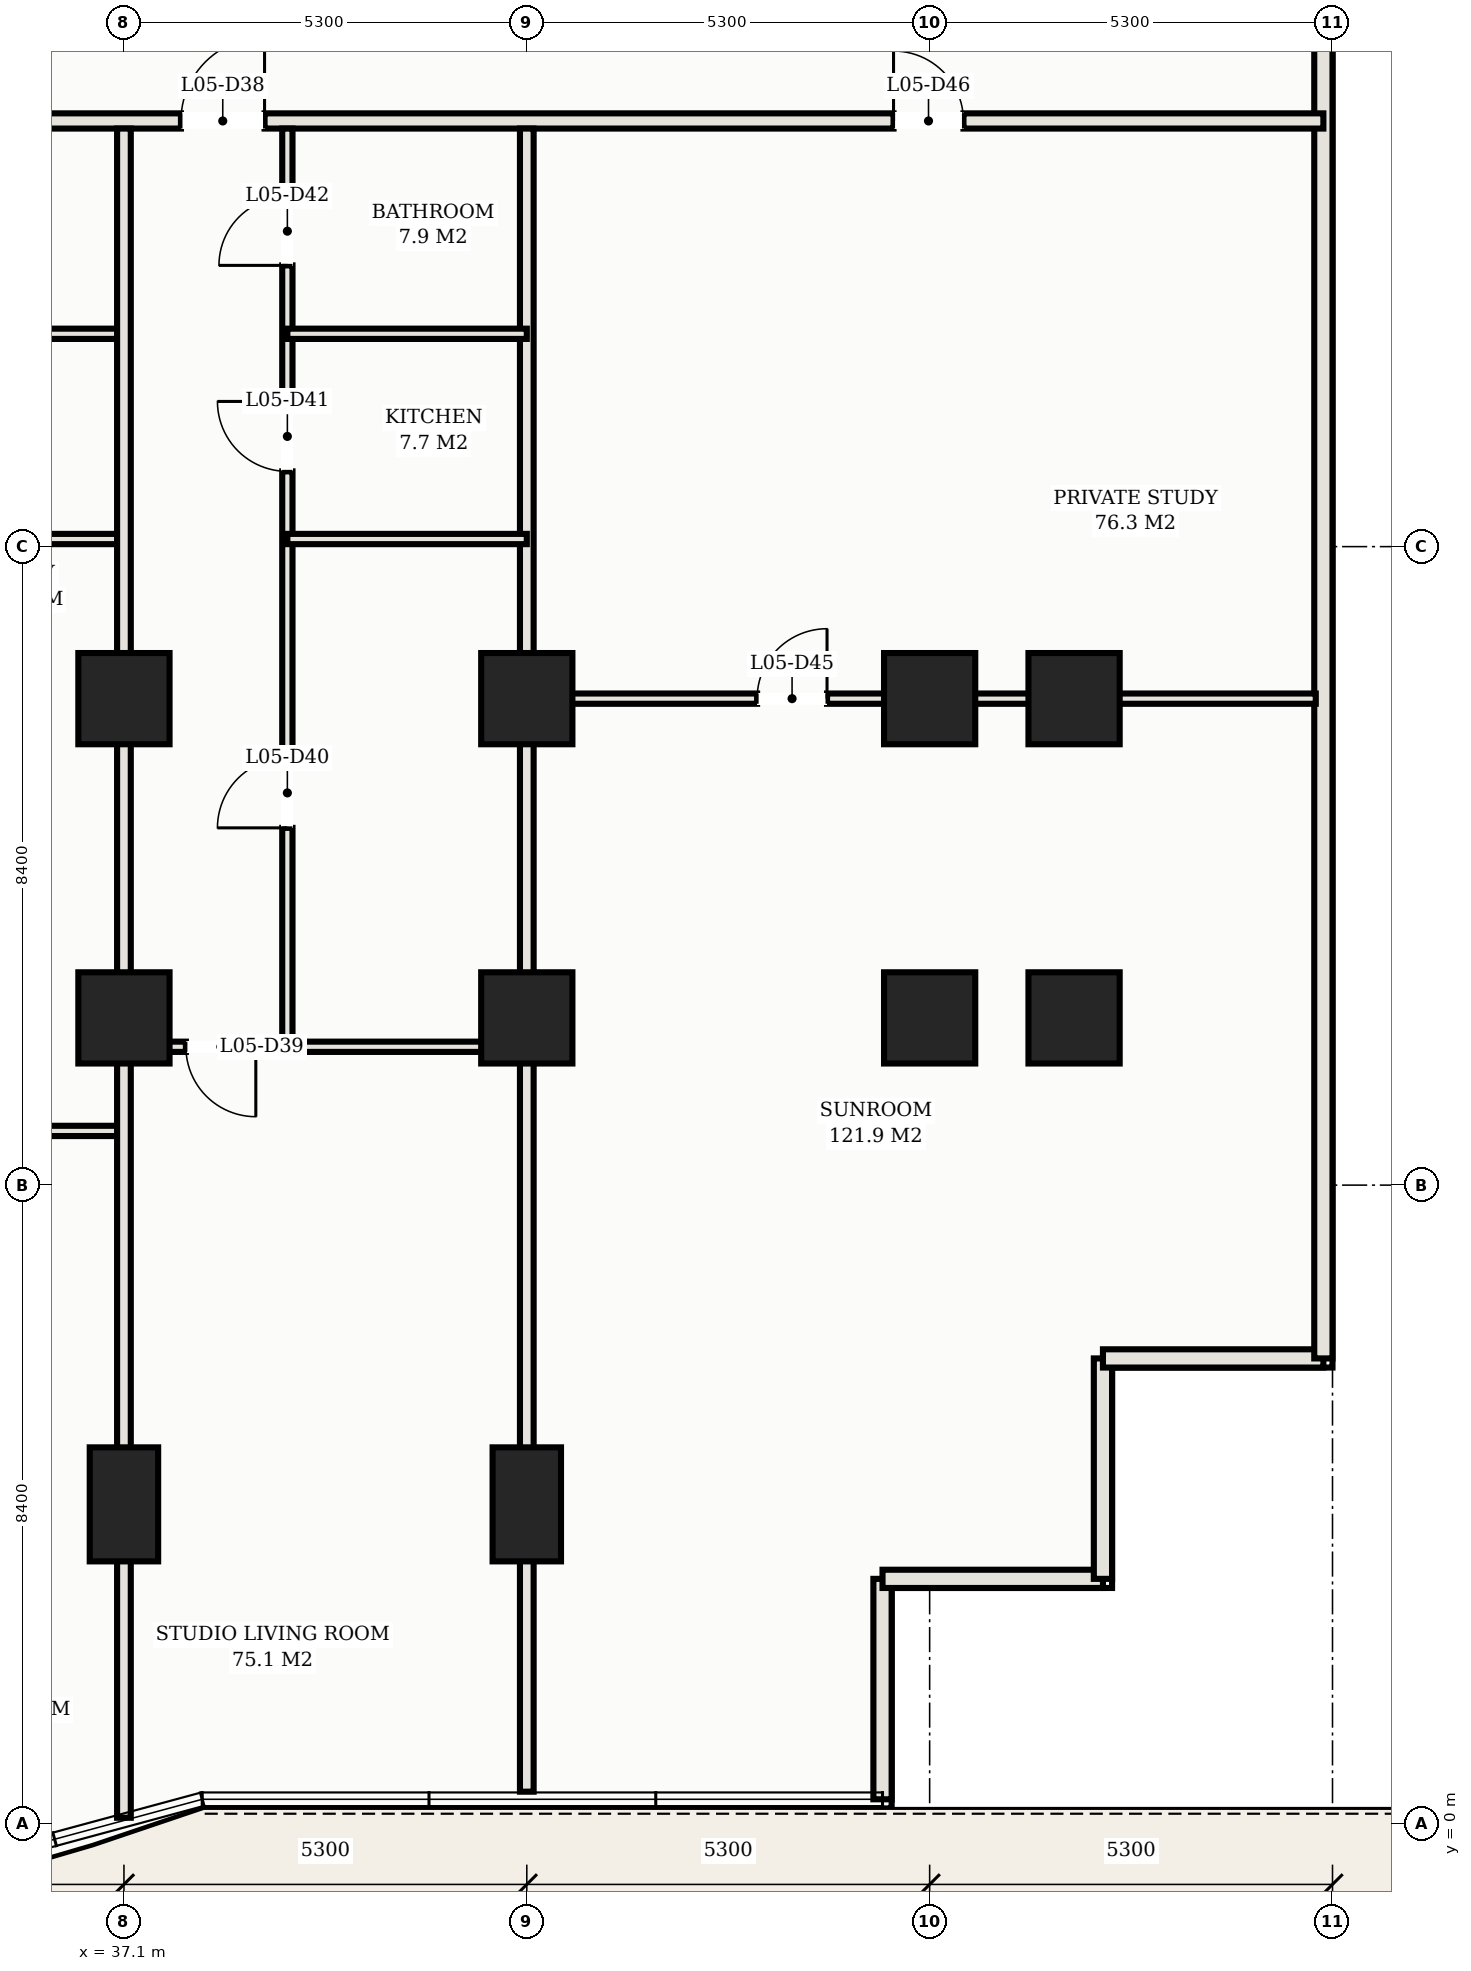
"""IFC4 building model, lengths in metres.
Left out: names, types, materials, properties, quantities, classifications, styles, units other than length and angle.
Written with IfcOpenShell. Run it as: python <this file> out.ifc"""

import sys

from ifc_helpers import new_model, si_unit, direction, frame, frame_2d, origin, origin_2d, place, context, subcontext, project, spatial, rectangle, hollow_rectangle, extrude, element, fill, save


model = new_model("IFC4")
c1 = context("Model", 3, precision=1e-05, world=origin(), true_north=direction((0.0, 1.0)))
c2 = subcontext(c1, "Body", "Model", "MODEL_VIEW")
j1 = project(units=[si_unit("LENGTHUNIT", "METRE"), si_unit("PLANEANGLEUNIT", "RADIAN")], contexts=[c1])
p1 = place(None, origin())
s1 = spatial("IfcSite", under=j1, at=p1, CompositionType="ELEMENT")
p2 = place(p1, origin())
s2 = spatial("IfcBuilding", under=s1, at=p2, CompositionType="ELEMENT")
p3 = place(p2, frame((0.0, 0.0, 24.2)))
s3 = spatial("IfcBuildingStorey", under=s2, at=p3, CompositionType="ELEMENT", Elevation=24.2)
for number, where, z_axis, x_axis in (
    (1, (37.1, 14.8, 0.0), (0.0, 0.0, 1.0), (1.0, 0.0, 0.0)),
    (2, (37.1, 10.6, 0.0), (0.0, 0.0, 1.0), (1.0, 0.0, 0.0)),
    (3, (42.4, 14.8, 0.0), (0.0, 0.0, 1.0), (1.0, 0.0, 0.0)),
    (4, (42.4, 10.6, 0.0), (0.0, 0.0, 1.0), (1.0, 0.0, 0.0)),
):
    element("IfcColumn", number, at=place(p3, frame(where, z_axis=z_axis, x_axis=x_axis)), inside=s3, PredefinedType="COLUMN", context=c2, shape_type="SweptSolid", body=[
        extrude(hollow_rectangle(XDim=1.2, YDim=1.2, WallThickness=0.04, at=origin_2d()), origin(), (0.0, 0.0, 1.0), 3.3),
    ])
for number, where, z_axis, x_axis in (
    (5, (37.1, 4.2, 0.0), (0.0, 0.0, 1.0), (1.0, 0.0, 0.0)),
    (6, (42.4, 4.2, 0.0), (0.0, 0.0, 1.0), (1.0, 0.0, 0.0)),
):
    element("IfcColumn", number, at=place(p3, frame(where, z_axis=z_axis, x_axis=x_axis)), inside=s3, PredefinedType="COLUMN", context=c2, shape_type="SweptSolid", body=[
        extrude(hollow_rectangle(XDim=0.9, YDim=1.5, WallThickness=0.036, at=origin_2d()), origin(), (0.0, 0.0, 1.0), 3.3),
    ])
for number, where, z_axis, x_axis in (
    (7, (47.7, 10.6, 0.0), (0.0, 0.0, 1.0), (1.0, 0.0, 0.0)),
    (8, (47.7, 14.8, 0.0), (0.0, 0.0, 1.0), (1.0, 0.0, 0.0)),
    (9, (49.6, 10.6, 0.0), (0.0, 0.0, 1.0), (1.0, 0.0, 0.0)),
    (10, (49.6, 14.8, 0.0), (0.0, 0.0, 1.0), (1.0, 0.0, 0.0)),
):
    element("IfcColumn", number, at=place(p3, frame(where, z_axis=z_axis, x_axis=x_axis)), inside=s3, PredefinedType="COLUMN", context=c2, shape_type="SweptSolid", body=[
        extrude(hollow_rectangle(XDim=1.2, YDim=1.2, WallThickness=0.04, at=origin_2d()), origin(), (0.0, 0.0, 1.0), 3.3),
    ])
for number, where, z_axis, x_axis in (
    (11, (47.08, 0.32, 0.0), (0.0, 0.0, 1.0), (0.0, 1.0, 0.0)),
    (12, (47.08, 3.22, 0.0), (0.0, 0.0, 1.0), (1.0, 0.0, 0.0)),
):
    element("IfcWall", number, at=place(p3, frame(where, z_axis=z_axis, x_axis=x_axis)), inside=s3, PredefinedType="SOLIDWALL", context=c2, shape_type="SweptSolid", body=[
        extrude(rectangle(XDim=2.9, YDim=0.24, at=frame_2d((1.45, 0.0))), origin(), (0.0, 0.0, 1.0), 3.08),
    ])
p4 = place(p3, frame((49.98, 3.22, 0.0), z_axis=(0.0, 0.0, 1.0), x_axis=(0.0, 1.0, 0.0)))
e13 = element("IfcWall", 13, at=p4, inside=s3, PredefinedType="SOLIDWALL", context=c2, shape_type="SweptSolid", body=[
    extrude(rectangle(XDim=2.9, YDim=0.24, at=frame_2d((1.45, 0.0))), origin(), (0.0, 0.0, 1.0), 3.08),
])
p5 = place(p3, frame((49.98, 6.12, 0.0), z_axis=(0.0, 0.0, 1.0), x_axis=(1.0, 0.0, 0.0)))
e14 = element("IfcWall", 14, at=p5, inside=s3, PredefinedType="SOLIDWALL", context=c2, shape_type="SweptSolid", body=[
    extrude(rectangle(XDim=2.9, YDim=0.24, at=frame_2d((1.45, 0.0))), origin(), (0.0, 0.0, 1.0), 3.08),
])
p6 = place(p3, frame((52.88, 6.12, 0.0), z_axis=(0.0, 0.0, 1.0), x_axis=(0.0, 1.0, 0.0)))
e15 = element("IfcWall", 15, at=p6, inside=s3, PredefinedType="SOLIDWALL", context=c2, shape_type="SweptSolid", body=[
    extrude(rectangle(XDim=28.81, YDim=0.24, at=frame_2d((14.405, 0.0))), origin(), (0.0, 0.0, 1.0), 3.08),
])
p7 = place(p3, frame((0.12, 22.4, 0.0), z_axis=(0.0, 0.0, 1.0), x_axis=(1.0, 0.0, 0.0)))
e16 = element("IfcWall", 16, at=p7, inside=s3, PredefinedType="PARTITIONING", context=c2, shape_type="SweptSolid", body=[
    extrude(rectangle(XDim=52.76, YDim=0.2, at=frame_2d((26.38, 0.0))), origin(), (0.0, 0.0, 1.0), 2.57),
])
p8 = place(p7, frame((11.23, 0.0, 0.0)))
e17 = element("IfcOpeningElement", 17, at=p8, cuts=e16, PredefinedType="OPENING", context=c2, shape_type="SweptSolid", body=[
    extrude(rectangle(XDim=1.1, YDim=2.25, at=frame_2d((0.55, 1.125))), frame((0.0, 0.11, 0.0), z_axis=(0.0, -1.0, 0.0), x_axis=(1.0, 0.0, 0.0)), (0.0, 0.0, 1.0), 0.22),
])
p9 = place(p7, frame((16.53, 0.0, 0.0)))
e18 = element("IfcOpeningElement", 18, at=p9, cuts=e16, PredefinedType="OPENING", context=c2, shape_type="SweptSolid", body=[
    extrude(rectangle(XDim=1.1, YDim=2.25, at=frame_2d((0.55, 1.125))), frame((0.0, 0.11, 0.0), z_axis=(0.0, -1.0, 0.0), x_axis=(1.0, 0.0, 0.0)), (0.0, 0.0, 1.0), 0.22),
])
p10 = place(p7, frame((21.83, 0.0, 0.0)))
e19 = element("IfcOpeningElement", 19, at=p10, cuts=e16, PredefinedType="OPENING", context=c2, shape_type="SweptSolid", body=[
    extrude(rectangle(XDim=1.1, YDim=2.25, at=frame_2d((0.55, 1.125))), frame((0.0, 0.11, 0.0), z_axis=(0.0, -1.0, 0.0), x_axis=(1.0, 0.0, 0.0)), (0.0, 0.0, 1.0), 0.22),
])
p11 = place(p7, frame((27.13, 0.0, 0.0)))
e20 = element("IfcOpeningElement", 20, at=p11, cuts=e16, PredefinedType="OPENING", context=c2, shape_type="SweptSolid", body=[
    extrude(rectangle(XDim=1.1, YDim=2.25, at=frame_2d((0.55, 1.125))), frame((0.0, 0.11, 0.0), z_axis=(0.0, -1.0, 0.0), x_axis=(1.0, 0.0, 0.0)), (0.0, 0.0, 1.0), 0.22),
])
p12 = place(p7, frame((32.43, 0.0, 0.0)))
e21 = element("IfcOpeningElement", 21, at=p12, cuts=e16, PredefinedType="OPENING", context=c2, shape_type="SweptSolid", body=[
    extrude(rectangle(XDim=1.1, YDim=2.25, at=frame_2d((0.55, 1.125))), frame((0.0, 0.11, 0.0), z_axis=(0.0, -1.0, 0.0), x_axis=(1.0, 0.0, 0.0)), (0.0, 0.0, 1.0), 0.22),
])
p13 = place(p7, frame((37.73, 0.0, 0.0)))
e22 = element("IfcOpeningElement", 22, at=p13, cuts=e16, PredefinedType="OPENING", context=c2, shape_type="SweptSolid", body=[
    extrude(rectangle(XDim=1.1, YDim=2.25, at=frame_2d((0.55, 1.125))), frame((0.0, 0.11, 0.0), z_axis=(0.0, -1.0, 0.0), x_axis=(1.0, 0.0, 0.0)), (0.0, 0.0, 1.0), 0.22),
])
p14 = place(p7, frame((4.735, 0.0, 0.0)))
e23 = element("IfcOpeningElement", 23, at=p14, cuts=e16, PredefinedType="OPENING", context=c2, shape_type="SweptSolid", body=[
    extrude(rectangle(XDim=0.92, YDim=2.15, at=frame_2d((0.46, 1.075))), frame((0.0, 0.11, 0.0), z_axis=(0.0, -1.0, 0.0), x_axis=(1.0, 0.0, 0.0)), (0.0, 0.0, 1.0), 0.22),
])
p15 = place(p7, frame((47.105, 0.0, 0.0)))
e24 = element("IfcOpeningElement", 24, at=p15, cuts=e16, PredefinedType="OPENING", context=c2, shape_type="SweptSolid", body=[
    extrude(rectangle(XDim=0.92, YDim=2.15, at=frame_2d((0.46, 1.075))), frame((0.0, 0.11, 0.0), z_axis=(0.0, -1.0, 0.0), x_axis=(1.0, 0.0, 0.0)), (0.0, 0.0, 1.0), 0.22),
])
p16 = place(p3, frame((42.4, 0.42, 0.0), z_axis=(0.0, 0.0, 1.0), x_axis=(0.0, 1.0, 0.0)))
e25 = element("IfcWall", 25, at=p16, inside=s3, PredefinedType="PARTITIONING", context=c2, shape_type="SweptSolid", body=[
    extrude(rectangle(XDim=21.88, YDim=0.18, at=frame_2d((10.94, 0.0))), origin(), (0.0, 0.0, 1.0), 2.275),
])
p17 = place(p3, frame((31.8, 9.113, 0.0), z_axis=(0.0, 0.0, 1.0), x_axis=(1.0, 0.0, 0.0)))
e26 = element("IfcWall", 26, at=p17, inside=s3, PredefinedType="PARTITIONING", context=c2, shape_type="SweptSolid", body=[
    extrude(rectangle(XDim=5.3, YDim=0.135, at=frame_2d((2.65, 0.0))), origin(), (0.0, 0.0, 1.0), 2.57),
])
p18 = place(p17, frame((0.815, 0.0, 0.0)))
e27 = element("IfcOpeningElement", 27, at=p18, cuts=e26, PredefinedType="OPENING", context=c2, shape_type="SweptSolid", body=[
    extrude(rectangle(XDim=0.92, YDim=2.15, at=frame_2d((0.46, 1.075))), frame((0.0, 0.078, 0.0), z_axis=(0.0, -1.0, 0.0), x_axis=(1.0, 0.0, 0.0)), (0.0, 0.0, 1.0), 0.155),
])
for number, where, z_axis, x_axis in (
    (28, (33.95, 16.9, 0.0), (0.0, 0.0, 1.0), (1.0, 0.0, 0.0)),
    (29, (33.95, 19.6, 0.0), (0.0, 0.0, 1.0), (1.0, 0.0, 0.0)),
):
    element("IfcWall", number, at=place(p3, frame(where, z_axis=z_axis, x_axis=x_axis)), inside=s3, PredefinedType="PARTITIONING", context=c2, shape_type="SweptSolid", body=[
        extrude(rectangle(XDim=3.15, YDim=0.135, at=frame_2d((1.575, 0.0))), origin(), (0.0, 0.0, 1.0), 2.57),
    ])
p19 = place(p3, frame((37.1, 0.077, 0.0), z_axis=(0.0, 0.0, 1.0), x_axis=(0.0, 1.0, 0.0)))
e30 = element("IfcWall", 30, at=p19, inside=s3, PredefinedType="PARTITIONING", context=c2, shape_type="SweptSolid", body=[
    extrude(rectangle(XDim=22.223, YDim=0.18, at=frame_2d((11.112, 0.0))), origin(), (0.0, 0.0, 1.0), 2.275),
])
p20 = place(p3, frame((37.1, 10.22, 0.0), z_axis=(0.0, 0.0, 1.0), x_axis=(1.0, 0.0, 0.0)))
e31 = element("IfcWall", 31, at=p20, inside=s3, PredefinedType="PARTITIONING", context=c2, shape_type="SweptSolid", body=[
    extrude(rectangle(XDim=5.3, YDim=0.135, at=frame_2d((2.65, 0.0))), origin(), (0.0, 0.0, 1.0), 2.57),
])
p21 = place(p20, frame((0.815, 0.0, 0.0)))
e32 = element("IfcOpeningElement", 32, at=p21, cuts=e31, PredefinedType="OPENING", context=c2, shape_type="SweptSolid", body=[
    extrude(rectangle(XDim=0.92, YDim=2.15, at=frame_2d((0.46, 1.075))), frame((0.0, 0.078, 0.0), z_axis=(0.0, -1.0, 0.0), x_axis=(1.0, 0.0, 0.0)), (0.0, 0.0, 1.0), 0.155),
])
p22 = place(p3, frame((39.25, 10.22, 0.0), z_axis=(0.0, 0.0, 1.0), x_axis=(0.0, 1.0, 0.0)))
e33 = element("IfcWall", 33, at=p22, inside=s3, PredefinedType="PARTITIONING", context=c2, shape_type="SweptSolid", body=[
    extrude(rectangle(XDim=12.08, YDim=0.135, at=frame_2d((6.04, 0.0))), origin(), (0.0, 0.0, 1.0), 2.57),
])
p23 = place(p22, frame((2.88, 0.0, 0.0)))
e34 = element("IfcOpeningElement", 34, at=p23, cuts=e33, PredefinedType="OPENING", context=c2, shape_type="SweptSolid", body=[
    extrude(rectangle(XDim=0.92, YDim=2.15, at=frame_2d((0.46, 1.075))), frame((0.0, 0.078, 0.0), z_axis=(0.0, -1.0, 0.0), x_axis=(1.0, 0.0, 0.0)), (0.0, 0.0, 1.0), 0.155),
])
p24 = place(p22, frame((7.57, 0.0, 0.0)))
e35 = element("IfcOpeningElement", 35, at=p24, cuts=e33, PredefinedType="OPENING", context=c2, shape_type="SweptSolid", body=[
    extrude(rectangle(XDim=0.92, YDim=2.15, at=frame_2d((0.46, 1.075))), frame((0.0, 0.078, 0.0), z_axis=(0.0, -1.0, 0.0), x_axis=(1.0, 0.0, 0.0)), (0.0, 0.0, 1.0), 0.155),
])
p25 = place(p22, frame((10.28, 0.0, 0.0)))
e36 = element("IfcOpeningElement", 36, at=p25, cuts=e33, PredefinedType="OPENING", context=c2, shape_type="SweptSolid", body=[
    extrude(rectangle(XDim=0.9, YDim=2.15, at=frame_2d((0.45, 1.075))), frame((0.0, 0.078, 0.0), z_axis=(0.0, -1.0, 0.0), x_axis=(1.0, 0.0, 0.0)), (0.0, 0.0, 1.0), 0.155),
])
for number, where, z_axis, x_axis in (
    (37, (39.25, 16.9, 0.0), (0.0, 0.0, 1.0), (1.0, 0.0, 0.0)),
    (38, (39.25, 19.6, 0.0), (0.0, 0.0, 1.0), (1.0, 0.0, 0.0)),
):
    element("IfcWall", number, at=place(p3, frame(where, z_axis=z_axis, x_axis=x_axis)), inside=s3, PredefinedType="PARTITIONING", context=c2, shape_type="SweptSolid", body=[
        extrude(rectangle(XDim=3.15, YDim=0.135, at=frame_2d((1.575, 0.0))), origin(), (0.0, 0.0, 1.0), 2.57),
    ])
p26 = place(p3, frame((42.4, 14.8, 0.0), z_axis=(0.0, 0.0, 1.0), x_axis=(1.0, 0.0, 0.0)))
e39 = element("IfcWall", 39, at=p26, inside=s3, PredefinedType="PARTITIONING", context=c2, shape_type="SweptSolid", body=[
    extrude(rectangle(XDim=10.38, YDim=0.135, at=frame_2d((5.19, 0.0))), origin(), (0.0, 0.0, 1.0), 2.275),
])
p27 = place(p26, frame((3.03, 0.0, 0.0)))
e40 = element("IfcOpeningElement", 40, at=p27, cuts=e39, PredefinedType="OPENING", context=c2, shape_type="SweptSolid", body=[
    extrude(rectangle(XDim=0.92, YDim=2.15, at=frame_2d((0.46, 1.075))), frame((0.0, 0.078, 0.0), z_axis=(0.0, -1.0, 0.0), x_axis=(1.0, 0.0, 0.0)), (0.0, 0.0, 1.0), 0.155),
])
p28 = place(p13, origin())
e41 = element("IfcDoor", 41, at=p28, inside=s3, OperationType="SINGLE_SWING_RIGHT", PredefinedType="DOOR", context=c2, shape_type="SweptSolid", body=[
    extrude(rectangle(XDim=1.1, YDim=2.25, at=frame_2d((0.55, 1.125))), frame((0.0, 0.025, 0.0), z_axis=(0.0, -1.0, 0.0), x_axis=(1.0, 0.0, 0.0)), (0.0, 0.0, 1.0), 0.05),
])
fill(e22, e41)
p29 = place(p21, frame((0.92, 0.0, 0.0), z_axis=(0.0, 0.0, 1.0), x_axis=(-1.0, 0.0, 0.0)))
e42 = element("IfcDoor", 42, at=p29, inside=s3, OperationType="SINGLE_SWING_LEFT", PredefinedType="DOOR", context=c2, shape_type="SweptSolid", body=[
    extrude(rectangle(XDim=0.92, YDim=2.15, at=frame_2d((0.46, 1.075))), frame((0.0, 0.025, 0.0), z_axis=(0.0, -1.0, 0.0), x_axis=(1.0, 0.0, 0.0)), (0.0, 0.0, 1.0), 0.05),
])
fill(e32, e42)
p30 = place(p23, origin())
e43 = element("IfcDoor", 43, at=p30, inside=s3, OperationType="SINGLE_SWING_LEFT", PredefinedType="DOOR", context=c2, shape_type="SweptSolid", body=[
    extrude(rectangle(XDim=0.92, YDim=2.15, at=frame_2d((0.46, 1.075))), frame((0.0, 0.025, 0.0), z_axis=(0.0, -1.0, 0.0), x_axis=(1.0, 0.0, 0.0)), (0.0, 0.0, 1.0), 0.05),
])
fill(e34, e43)
p31 = place(p24, origin())
e44 = element("IfcDoor", 44, at=p31, inside=s3, OperationType="SINGLE_SWING_RIGHT", PredefinedType="DOOR", context=c2, shape_type="SweptSolid", body=[
    extrude(rectangle(XDim=0.92, YDim=2.15, at=frame_2d((0.46, 1.075))), frame((0.0, 0.025, 0.0), z_axis=(0.0, -1.0, 0.0), x_axis=(1.0, 0.0, 0.0)), (0.0, 0.0, 1.0), 0.05),
])
fill(e35, e44)
p32 = place(p25, origin())
e45 = element("IfcDoor", 45, at=p32, inside=s3, OperationType="SINGLE_SWING_LEFT", PredefinedType="DOOR", context=c2, shape_type="SweptSolid", body=[
    extrude(rectangle(XDim=0.9, YDim=2.15, at=frame_2d((0.45, 1.075))), frame((0.0, 0.025, 0.0), z_axis=(0.0, -1.0, 0.0), x_axis=(1.0, 0.0, 0.0)), (0.0, 0.0, 1.0), 0.05),
])
fill(e36, e45)
p33 = place(p27, origin())
e46 = element("IfcDoor", 46, at=p33, inside=s3, OperationType="SINGLE_SWING_RIGHT", PredefinedType="DOOR", context=c2, shape_type="SweptSolid", body=[
    extrude(rectangle(XDim=0.92, YDim=2.15, at=frame_2d((0.46, 1.075))), frame((0.0, 0.025, 0.0), z_axis=(0.0, -1.0, 0.0), x_axis=(1.0, 0.0, 0.0)), (0.0, 0.0, 1.0), 0.05),
])
fill(e40, e46)
p34 = place(p15, origin())
e47 = element("IfcDoor", 47, at=p34, inside=s3, OperationType="SINGLE_SWING_LEFT", PredefinedType="DOOR", context=c2, shape_type="SweptSolid", body=[
    extrude(rectangle(XDim=0.92, YDim=2.15, at=frame_2d((0.46, 1.075))), frame((0.0, 0.025, 0.0), z_axis=(0.0, -1.0, 0.0), x_axis=(1.0, 0.0, 0.0)), (0.0, 0.0, 1.0), 0.05),
])
fill(e24, e47)
save(model, sys.argv[1])
